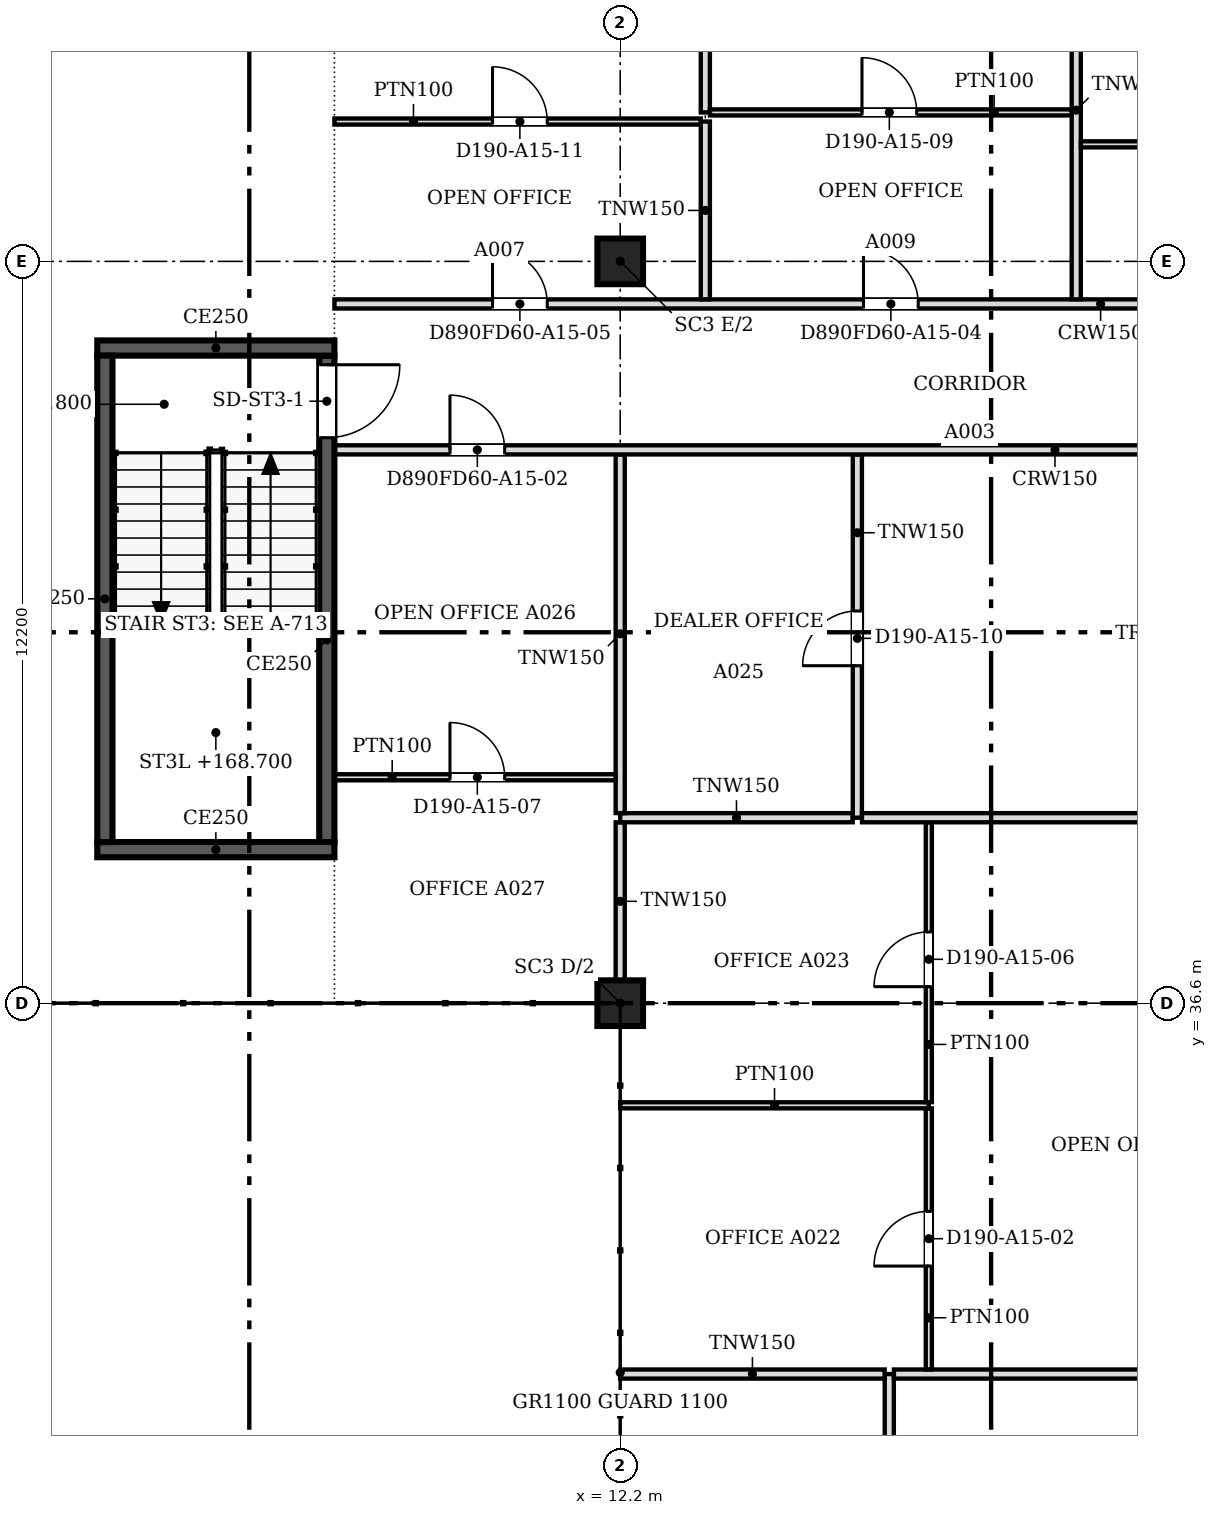
"""IFC4 building model, lengths in metres.
Left out: names, types, materials, properties, quantities, classifications, styles, units other than length and angle.
Written with IfcOpenShell. Run it as: python <this file> out.ifc"""

import sys

from ifc_helpers import new_model, si_unit, direction, frame, frame_2d, origin, origin_2d, place, context, subcontext, project, spatial, polyline, rectangle, outline, extrude, faceted_brep, source, transform, mapped, element, fill, save


model = new_model("IFC4")
c1 = context("Model", 3, precision=1e-05, world=origin(), true_north=direction((0.0, 1.0)))
c2 = subcontext(c1, "Body", "Model", "MODEL_VIEW")
j1 = project(units=[si_unit("LENGTHUNIT", "METRE"), si_unit("PLANEANGLEUNIT", "RADIAN")], contexts=[c1])
p1 = place(None, origin())
s1 = spatial("IfcSite", under=j1, at=p1, CompositionType="ELEMENT")
p2 = place(p1, origin())
s2 = spatial("IfcBuilding", under=s1, at=p2, CompositionType="ELEMENT")
p3 = place(p2, frame((0.0, 0.0, 166.8)))
s3 = spatial("IfcBuildingStorey", under=s2, at=p3, CompositionType="ELEMENT", Elevation=166.8)
for number, where, z_axis, x_axis in (
    (1, (12.2, 36.6, 0.0), (0.0, 0.0, 1.0), (1.0, 0.0, 0.0)),
    (2, (12.2, 48.8, 0.0), (0.0, 0.0, 1.0), (1.0, 0.0, 0.0)),
):
    element("IfcColumn", number, at=place(p3, frame(where, z_axis=z_axis, x_axis=x_axis)), inside=s3, PredefinedType="COLUMN", context=c2, shape_type="SweptSolid", body=[
        extrude(rectangle(XDim=0.75, YDim=0.75, at=origin_2d()), origin(), (0.0, 0.0, 1.0), 3.6),
    ])
m1 = source(origin(), c2, "Body", "Brep", [
    faceted_brep([(0.053, -0.25, 0.0), (2.997, -0.25, 3.8), (0.053, -0.25, 7.6), (0.0, -0.25, 7.532), (0.0, -0.25, 0.068), (0.106, 0.25, 7.532), (2.944, 0.25, 3.868), (2.944, 0.25, 3.732), (0.106, 0.25, 0.068), (2.997, 0.0, 3.8), (0.053, 0.0, 0.0), (0.053, 0.0, 7.6)], [[[0, 1, 2, 3, 4]], [[5, 6, 7, 8]], [[8, 7, 9, 1, 0, 10]], [[6, 5, 11, 2, 1, 9]], [[3, 2, 11]], [[10, 0, 4]], [[8, 10, 4, 3, 11, 5]], [[9, 7, 6]]]),
])
p4 = place(p3, frame((3.431, 53.625, -3.8), z_axis=(0.0, 0.0, 1.0), x_axis=(-0.707106781187, -0.707106781187, 0.0)))
e3 = element("IfcWall", 3, at=p4, inside=s3, PredefinedType="SOLIDWALL", context=c2, shape_type="MappedRepresentation", body=[
    mapped(m1, transform((0.0, 0.0, 0.0), scale=1.0)),
])
m2 = source(origin(), c2, "Body", "SweptSolid", [
    extrude(outline(polyline([(0.253, 0.666), (2.681, 3.8), (0.253, 6.934), (0.253, 0.666)])), frame((0.0, 0.26, 0.0), z_axis=(0.0, -1.0, 0.0), x_axis=(1.0, 0.0, 0.0)), (0.0, 0.0, 1.0), 0.52),
])
p5 = place(p4, origin())
e4 = element("IfcOpeningElement", 4, at=p5, cuts=e3, PredefinedType="OPENING", context=c2, shape_type="MappedRepresentation", body=[
    mapped(m2, transform((0.0, 0.0, 0.0), scale=1.0)),
])
p6 = place(p2, frame((0.0, 0.0, 170.6)))
s4 = spatial("IfcBuildingStorey", under=s2, at=p6, CompositionType="ELEMENT", Elevation=170.6)
m3 = source(origin(), c2, "Body", "Brep", [
    faceted_brep([(2.944, -0.25, 0.0), (2.997, -0.25, 0.068), (2.997, -0.25, 7.532), (2.944, -0.25, 7.6), (0.0, -0.25, 3.8), (0.053, 0.25, 3.868), (2.891, 0.25, 7.532), (2.891, 0.25, 0.068), (0.053, 0.25, 3.732), (2.944, 0.0, 0.0), (2.944, 0.0, 7.6), (0.0, 0.0, 3.8)], [[[0, 1, 2, 3, 4]], [[5, 6, 7, 8]], [[1, 0, 9]], [[10, 3, 2]], [[6, 5, 11, 4, 3, 10]], [[8, 7, 9, 0, 4, 11]], [[8, 11, 5]], [[1, 9, 7, 6, 10, 2]]]),
])
p7 = place(p6, frame((3.394, 53.588, -3.8), z_axis=(0.0, 0.0, 1.0), x_axis=(-0.707106781187, -0.707106781187, 0.0)))
e5 = element("IfcWall", 5, at=p7, inside=s4, PredefinedType="SOLIDWALL", context=c2, shape_type="MappedRepresentation", body=[
    mapped(m3, transform((0.0, 0.0, 0.0), scale=1.0)),
])
m4 = source(origin(), c2, "Body", "SweptSolid", [
    extrude(outline(polyline([(2.744, 6.934), (0.316, 3.8), (2.744, 0.666), (2.744, 6.934)])), frame((0.0, 0.26, 0.0), z_axis=(0.0, -1.0, 0.0), x_axis=(1.0, 0.0, 0.0)), (0.0, 0.0, 1.0), 0.52),
])
p8 = place(p7, origin())
e6 = element("IfcOpeningElement", 6, at=p8, cuts=e5, PredefinedType="OPENING", context=c2, shape_type="MappedRepresentation", body=[
    mapped(m4, transform((0.0, 0.0, 0.0), scale=1.0)),
])
p9 = place(p3, frame((7.5, 39.125, 0.0), z_axis=(0.0, 0.0, 1.0), x_axis=(-1.0, 0.0, 0.0)))
e7 = element("IfcWall", 7, at=p9, inside=s3, PredefinedType="SOLIDWALL", context=c2, shape_type="SweptSolid", body=[
    extrude(rectangle(XDim=3.9, YDim=0.25, at=frame_2d((1.95, 0.0))), origin(), (0.0, 0.0, 1.0), 3.8),
])
p10 = place(p3, frame((3.725, 39.25, 0.0), z_axis=(0.0, 0.0, 1.0), x_axis=(0.0, 1.0, 0.0)))
e8 = element("IfcWall", 8, at=p10, inside=s3, PredefinedType="SOLIDWALL", context=c2, shape_type="SweptSolid", body=[
    extrude(rectangle(XDim=8.0, YDim=0.25, at=frame_2d((4.0, 0.0))), origin(), (0.0, 0.0, 1.0), 3.8),
])
p11 = place(p3, frame((3.6, 47.375, 0.0), z_axis=(0.0, 0.0, 1.0), x_axis=(1.0, 0.0, 0.0)))
e9 = element("IfcWall", 9, at=p11, inside=s3, PredefinedType="SOLIDWALL", context=c2, shape_type="SweptSolid", body=[
    extrude(rectangle(XDim=3.9, YDim=0.25, at=frame_2d((1.95, 0.0))), origin(), (0.0, 0.0, 1.0), 3.8),
])
p12 = place(p3, frame((7.375, 47.25, 0.0), z_axis=(0.0, 0.0, 1.0), x_axis=(0.0, -1.0, 0.0)))
e10 = element("IfcWall", 10, at=p12, inside=s3, PredefinedType="SOLIDWALL", context=c2, shape_type="SweptSolid", body=[
    extrude(rectangle(XDim=8.0, YDim=0.25, at=frame_2d((4.0, 0.0))), origin(), (0.0, 0.0, 1.0), 3.8),
])
m5 = source(origin(), c2, "Body", "SweptSolid", [
    extrude(rectangle(XDim=1.2, YDim=2.1, at=frame_2d((0.6, 1.05))), frame((0.0, 0.135, 0.0), z_axis=(0.0, -1.0, 0.0), x_axis=(1.0, 0.0, 0.0)), (0.0, 0.0, 1.0), 0.27),
])
p13 = place(p12, frame((0.15, 0.0, 0.0)))
e11 = element("IfcOpeningElement", 11, at=p13, cuts=e10, PredefinedType="OPENING", context=c2, shape_type="MappedRepresentation", body=[
    mapped(m5, transform((0.0, 0.0, 0.0), scale=1.0)),
])
p14 = place(p3, frame((16.625, 24.476, 0.0), z_axis=(0.0, 0.0, 1.0), x_axis=(0.0, 1.0, 0.0)))
e12 = element("IfcWall", 12, at=p14, inside=s3, PredefinedType="PARTITIONING", context=c2, shape_type="SweptSolid", body=[
    extrude(rectangle(XDim=6.024, YDim=0.15, at=frame_2d((3.012, 0.0))), origin(), (0.0, 0.0, 1.0), 3.067),
])
m6 = source(origin(), c2, "Body", "SweptSolid", [
    extrude(rectangle(XDim=0.9, YDim=2.1, at=frame_2d((0.45, 1.05))), frame((0.0, 0.085, 0.0), z_axis=(0.0, -1.0, 0.0), x_axis=(1.0, 0.0, 0.0)), (0.0, 0.0, 1.0), 0.17),
])
p15 = place(p14, frame((2.6, 0.0, 0.0)))
e13 = element("IfcOpeningElement", 13, at=p15, cuts=e12, PredefinedType="OPENING", context=c2, shape_type="MappedRepresentation", body=[
    mapped(m6, transform((0.0, 0.0, 0.0), scale=1.0)),
])
p16 = place(p3, frame((12.2, 30.5, 0.0), z_axis=(0.0, 0.0, 1.0), x_axis=(1.0, 0.0, 0.0)))
e14 = element("IfcWall", 14, at=p16, inside=s3, PredefinedType="PARTITIONING", context=c2, shape_type="SweptSolid", body=[
    extrude(rectangle(XDim=4.349, YDim=0.15, at=frame_2d((2.175, 0.0))), origin(), (0.0, 0.0, 1.0), 3.067),
])
p17 = place(p3, frame((16.701, 30.5, 0.0), z_axis=(0.0, 0.0, 1.0), x_axis=(1.0, 0.0, 0.0)))
e15 = element("IfcWall", 15, at=p17, inside=s3, PredefinedType="PARTITIONING", context=c2, shape_type="SweptSolid", body=[
    extrude(rectangle(XDim=11.623, YDim=0.15, at=frame_2d((5.812, 0.0))), origin(), (0.0, 0.0, 1.0), 3.067),
])
p18 = place(p3, frame((17.275, 30.576, 0.0), z_axis=(0.0, 0.0, 1.0), x_axis=(0.0, 1.0, 0.0)))
e16 = element("IfcWall", 16, at=p18, inside=s3, PredefinedType="PARTITIONING", context=c2, shape_type="SweptSolid", body=[
    extrude(rectangle(XDim=4.293, YDim=0.1, at=frame_2d((2.147, 0.0))), origin(), (0.0, 0.0, 1.0), 3.067),
])
m7 = source(origin(), c2, "Body", "SweptSolid", [
    extrude(rectangle(XDim=0.9, YDim=2.1, at=frame_2d((0.45, 1.05))), frame((0.0, 0.06, 0.0), z_axis=(0.0, -1.0, 0.0), x_axis=(1.0, 0.0, 0.0)), (0.0, 0.0, 1.0), 0.12),
])
p19 = place(p18, frame((1.7, 0.0, 0.0)))
e17 = element("IfcOpeningElement", 17, at=p19, cuts=e16, PredefinedType="OPENING", context=c2, shape_type="MappedRepresentation", body=[
    mapped(m7, transform((0.0, 0.0, 0.0), scale=1.0)),
])
p20 = place(p3, frame((12.2, 34.92, 0.0), z_axis=(0.0, 0.0, 1.0), x_axis=(1.0, 0.0, 0.0)))
e18 = element("IfcWall", 18, at=p20, inside=s3, PredefinedType="PARTITIONING", context=c2, shape_type="SweptSolid", body=[
    extrude(rectangle(XDim=5.075, YDim=0.1, at=frame_2d((2.538, 0.0))), origin(), (0.0, 0.0, 1.0), 3.067),
])
p21 = place(p3, frame((17.275, 34.971, 0.0), z_axis=(0.0, 0.0, 1.0), x_axis=(0.0, 1.0, 0.0)))
e19 = element("IfcWall", 19, at=p21, inside=s3, PredefinedType="PARTITIONING", context=c2, shape_type="SweptSolid", body=[
    extrude(rectangle(XDim=4.603, YDim=0.1, at=frame_2d((2.301, 0.0))), origin(), (0.0, 0.0, 1.0), 3.067),
])
p22 = place(p21, frame((1.9, 0.0, 0.0)))
e20 = element("IfcOpeningElement", 20, at=p22, cuts=e19, PredefinedType="OPENING", context=c2, shape_type="MappedRepresentation", body=[
    mapped(m7, transform((0.0, 0.0, 0.0), scale=1.0)),
])
p23 = place(p3, frame((12.2, 36.976, 0.0), z_axis=(0.0, 0.0, 1.0), x_axis=(0.0, 1.0, 0.0)))
e21 = element("IfcWall", 21, at=p23, inside=s3, PredefinedType="PARTITIONING", context=c2, shape_type="SweptSolid", body=[
    extrude(rectangle(XDim=2.598, YDim=0.15, at=frame_2d((1.299, 0.0))), origin(), (0.0, 0.0, 1.0), 3.067),
])
p24 = place(p3, frame((12.2, 39.65, 0.0), z_axis=(0.0, 0.0, 1.0), x_axis=(1.0, 0.0, 0.0)))
e22 = element("IfcWall", 22, at=p24, inside=s3, PredefinedType="PARTITIONING", context=c2, shape_type="SweptSolid", body=[
    extrude(rectangle(XDim=3.824, YDim=0.15, at=frame_2d((1.912, 0.0))), origin(), (0.0, 0.0, 1.0), 3.067),
])
p25 = place(p3, frame((16.1, 39.65, 0.0), z_axis=(0.0, 0.0, 1.0), x_axis=(0.0, 1.0, 0.0)))
e23 = element("IfcWall", 23, at=p25, inside=s3, PredefinedType="PARTITIONING", context=c2, shape_type="SweptSolid", body=[
    extrude(rectangle(XDim=5.974, YDim=0.15, at=frame_2d((2.987, 0.0))), origin(), (0.0, 0.0, 1.0), 3.067),
])
p26 = place(p25, frame((2.5, 0.0, 0.0)))
e24 = element("IfcOpeningElement", 24, at=p26, cuts=e23, PredefinedType="OPENING", context=c2, shape_type="MappedRepresentation", body=[
    mapped(m6, transform((0.0, 0.0, 0.0), scale=1.0)),
])
p27 = place(p3, frame((16.176, 39.65, 0.0), z_axis=(0.0, 0.0, 1.0), x_axis=(1.0, 0.0, 0.0)))
e25 = element("IfcWall", 25, at=p27, inside=s3, PredefinedType="PARTITIONING", context=c2, shape_type="SweptSolid", body=[
    extrude(rectangle(XDim=12.148, YDim=0.15, at=frame_2d((6.074, 0.0))), origin(), (0.0, 0.0, 1.0), 3.067),
])
p28 = place(p3, frame((12.2, 39.726, 0.0), z_axis=(0.0, 0.0, 1.0), x_axis=(0.0, 1.0, 0.0)))
e26 = element("IfcWall", 26, at=p28, inside=s3, PredefinedType="PARTITIONING", context=c2, shape_type="SweptSolid", body=[
    extrude(rectangle(XDim=5.898, YDim=0.15, at=frame_2d((2.949, 0.0))), origin(), (0.0, 0.0, 1.0), 3.067),
])
p29 = place(p3, frame((12.124, 40.315, 0.0), z_axis=(0.0, 0.0, 1.0), x_axis=(-1.0, 0.0, 0.0)))
e27 = element("IfcWall", 27, at=p29, inside=s3, PredefinedType="PARTITIONING", context=c2, shape_type="SweptSolid", body=[
    extrude(rectangle(XDim=4.624, YDim=0.1, at=frame_2d((2.312, 0.0))), origin(), (0.0, 0.0, 1.0), 3.067),
])
p30 = place(p29, frame((1.824, 0.0, 0.0)))
e28 = element("IfcOpeningElement", 28, at=p30, cuts=e27, PredefinedType="OPENING", context=c2, shape_type="MappedRepresentation", body=[
    mapped(m7, transform((0.0, 0.0, 0.0), scale=1.0)),
])
p31 = place(p3, frame((28.4, 45.7, 0.0), z_axis=(0.0, 0.0, 1.0), x_axis=(-1.0, 0.0, 0.0)))
e29 = element("IfcWall", 29, at=p31, inside=s3, PredefinedType="PARTITIONING", context=c2, shape_type="SweptSolid", body=[
    extrude(rectangle(XDim=20.9, YDim=0.15, at=frame_2d((10.45, 0.0))), origin(), (0.0, 0.0, 1.0), 3.067),
])
p32 = place(p31, frame((18.1, 0.0, 0.0)))
e30 = element("IfcOpeningElement", 30, at=p32, cuts=e29, PredefinedType="OPENING", context=c2, shape_type="MappedRepresentation", body=[
    mapped(m6, transform((0.0, 0.0, 0.0), scale=1.0)),
])
p33 = place(p3, frame((7.5, 48.1, 0.0), z_axis=(0.0, 0.0, 1.0), x_axis=(1.0, 0.0, 0.0)))
e31 = element("IfcWall", 31, at=p33, inside=s3, PredefinedType="PARTITIONING", context=c2, shape_type="SweptSolid", body=[
    extrude(rectangle(XDim=20.9, YDim=0.15, at=frame_2d((10.45, 0.0))), origin(), (0.0, 0.0, 1.0), 3.067),
])
p34 = place(p33, frame((8.701, 0.0, 0.0)))
e32 = element("IfcOpeningElement", 32, at=p34, cuts=e31, PredefinedType="OPENING", context=c2, shape_type="MappedRepresentation", body=[
    mapped(m6, transform((0.0, 0.0, 0.0), scale=1.0)),
])
p35 = place(p33, frame((2.6, 0.0, 0.0)))
e33 = element("IfcOpeningElement", 33, at=p35, cuts=e31, PredefinedType="OPENING", context=c2, shape_type="MappedRepresentation", body=[
    mapped(m6, transform((0.0, 0.0, 0.0), scale=1.0)),
])
p36 = place(p33, frame((15.6, 0.0, 0.0)))
e34 = element("IfcOpeningElement", 34, at=p36, cuts=e31, PredefinedType="OPENING", context=c2, shape_type="MappedRepresentation", body=[
    mapped(m6, transform((0.0, 0.0, 0.0), scale=1.0)),
])
p37 = place(p3, frame((13.6, 48.176, 0.0), z_axis=(0.0, 0.0, 1.0), x_axis=(0.0, 1.0, 0.0)))
e35 = element("IfcWall", 35, at=p37, inside=s3, PredefinedType="PARTITIONING", context=c2, shape_type="SweptSolid", body=[
    extrude(rectangle(XDim=2.924, YDim=0.15, at=frame_2d((1.462, 0.0))), origin(), (0.0, 0.0, 1.0), 3.067),
])
p38 = place(p3, frame((19.7, 48.176, 0.0), z_axis=(0.0, 0.0, 1.0), x_axis=(0.0, 1.0, 0.0)))
e36 = element("IfcWall", 36, at=p38, inside=s3, PredefinedType="PARTITIONING", context=c2, shape_type="SweptSolid", body=[
    extrude(rectangle(XDim=6.224, YDim=0.15, at=frame_2d((3.112, 0.0))), origin(), (0.0, 0.0, 1.0), 3.067),
])
p39 = place(p3, frame((19.776, 50.725, 0.0), z_axis=(0.0, 0.0, 1.0), x_axis=(1.0, 0.0, 0.0)))
e37 = element("IfcWall", 37, at=p39, inside=s3, PredefinedType="PARTITIONING", context=c2, shape_type="SweptSolid", body=[
    extrude(rectangle(XDim=8.548, YDim=0.1, at=frame_2d((4.274, 0.0))), origin(), (0.0, 0.0, 1.0), 3.067),
])
p40 = place(p39, frame((1.6, 0.0, 0.0)))
e38 = element("IfcOpeningElement", 38, at=p40, cuts=e37, PredefinedType="OPENING", context=c2, shape_type="MappedRepresentation", body=[
    mapped(m7, transform((0.0, 0.0, 0.0), scale=1.0)),
])
p41 = place(p39, frame((5.927, 0.0, 0.0)))
e39 = element("IfcOpeningElement", 39, at=p41, cuts=e37, PredefinedType="OPENING", context=c2, shape_type="MappedRepresentation", body=[
    mapped(m7, transform((0.0, 0.0, 0.0), scale=1.0)),
])
p42 = place(p3, frame((7.5, 51.1, 0.0), z_axis=(0.0, 0.0, 1.0), x_axis=(1.0, 0.0, 0.0)))
e40 = element("IfcWall", 40, at=p42, inside=s3, PredefinedType="PARTITIONING", context=c2, shape_type="SweptSolid", body=[
    extrude(rectangle(XDim=6.024, YDim=0.1, at=frame_2d((3.012, 0.0))), origin(), (0.0, 0.0, 1.0), 3.067),
])
p43 = place(p42, frame((2.6, 0.0, 0.0)))
e41 = element("IfcOpeningElement", 41, at=p43, cuts=e40, PredefinedType="OPENING", context=c2, shape_type="MappedRepresentation", body=[
    mapped(m7, transform((0.0, 0.0, 0.0), scale=1.0)),
])
p44 = place(p3, frame((13.6, 51.25, 0.0), z_axis=(0.0, 0.0, 1.0), x_axis=(0.0, 1.0, 0.0)))
e42 = element("IfcWall", 42, at=p44, inside=s3, PredefinedType="PARTITIONING", context=c2, shape_type="SweptSolid", body=[
    extrude(rectangle(XDim=3.15, YDim=0.15, at=frame_2d((1.575, 0.0))), origin(), (0.0, 0.0, 1.0), 3.067),
])
p45 = place(p3, frame((13.676, 51.25, 0.0), z_axis=(0.0, 0.0, 1.0), x_axis=(1.0, 0.0, 0.0)))
e43 = element("IfcWall", 43, at=p45, inside=s3, PredefinedType="PARTITIONING", context=c2, shape_type="SweptSolid", body=[
    extrude(rectangle(XDim=5.948, YDim=0.1, at=frame_2d((2.974, 0.0))), origin(), (0.0, 0.0, 1.0), 3.067),
])
p46 = place(p45, frame((2.5, 0.0, 0.0)))
e44 = element("IfcOpeningElement", 44, at=p46, cuts=e43, PredefinedType="OPENING", context=c2, shape_type="MappedRepresentation", body=[
    mapped(m7, transform((0.0, 0.0, 0.0), scale=1.0)),
])
m8 = source(origin(), c2, "Body", "SweptSolid", [
    extrude(rectangle(XDim=1.2, YDim=2.1, at=frame_2d((0.6, 1.05))), frame((0.0, 0.025, 0.0), z_axis=(0.0, -1.0, 0.0), x_axis=(1.0, 0.0, 0.0)), (0.0, 0.0, 1.0), 0.05),
])
p47 = place(p13, origin())
e45 = element("IfcDoor", 45, at=p47, inside=s3, OperationType="SINGLE_SWING_LEFT", PredefinedType="DOOR", context=c2, shape_type="MappedRepresentation", body=[
    mapped(m8, transform((0.0, 0.0, 0.0), scale=1.0)),
])
fill(e11, e45)
m9 = source(origin(), c2, "Body", "SweptSolid", [
    extrude(rectangle(XDim=0.9, YDim=2.1, at=frame_2d((0.45, 1.05))), frame((0.0, 0.025, 0.0), z_axis=(0.0, -1.0, 0.0), x_axis=(1.0, 0.0, 0.0)), (0.0, 0.0, 1.0), 0.05),
])
p48 = place(p19, origin())
e46 = element("IfcDoor", 46, at=p48, inside=s3, OperationType="SINGLE_SWING_LEFT", PredefinedType="DOOR", context=c2, shape_type="MappedRepresentation", body=[
    mapped(m9, transform((0.0, 0.0, 0.0), scale=1.0)),
])
fill(e17, e46)
p49 = place(p22, origin())
e47 = element("IfcDoor", 47, at=p49, inside=s3, OperationType="SINGLE_SWING_LEFT", PredefinedType="DOOR", context=c2, shape_type="MappedRepresentation", body=[
    mapped(m9, transform((0.0, 0.0, 0.0), scale=1.0)),
])
fill(e20, e47)
p50 = place(p30, origin())
e48 = element("IfcDoor", 48, at=p50, inside=s3, OperationType="SINGLE_SWING_RIGHT", PredefinedType="DOOR", context=c2, shape_type="MappedRepresentation", body=[
    mapped(m9, transform((0.0, 0.0, 0.0), scale=1.0)),
])
fill(e28, e48)
p51 = place(p32, origin())
e49 = element("IfcDoor", 49, at=p51, inside=s3, OperationType="SINGLE_SWING_RIGHT", PredefinedType="DOOR", context=c2, shape_type="MappedRepresentation", body=[
    mapped(m9, transform((0.0, 0.0, 0.0), scale=1.0)),
])
fill(e30, e49)
p52 = place(p46, origin())
e50 = element("IfcDoor", 50, at=p52, inside=s3, OperationType="SINGLE_SWING_LEFT", PredefinedType="DOOR", context=c2, shape_type="MappedRepresentation", body=[
    mapped(m9, transform((0.0, 0.0, 0.0), scale=1.0)),
])
fill(e44, e50)
p53 = place(p26, origin())
e51 = element("IfcDoor", 51, at=p53, inside=s3, OperationType="SINGLE_SWING_LEFT", PredefinedType="DOOR", context=c2, shape_type="MappedRepresentation", body=[
    mapped(m9, transform((0.0, 0.0, 0.0), scale=1.0)),
])
fill(e24, e51)
p54 = place(p43, origin())
e52 = element("IfcDoor", 52, at=p54, inside=s3, OperationType="SINGLE_SWING_LEFT", PredefinedType="DOOR", context=c2, shape_type="MappedRepresentation", body=[
    mapped(m9, transform((0.0, 0.0, 0.0), scale=1.0)),
])
fill(e41, e52)
p55 = place(p34, origin())
e53 = element("IfcDoor", 53, at=p55, inside=s3, OperationType="SINGLE_SWING_LEFT", PredefinedType="DOOR", context=c2, shape_type="MappedRepresentation", body=[
    mapped(m9, transform((0.0, 0.0, 0.0), scale=1.0)),
])
fill(e32, e53)
p56 = place(p35, origin())
e54 = element("IfcDoor", 54, at=p56, inside=s3, OperationType="SINGLE_SWING_LEFT", PredefinedType="DOOR", context=c2, shape_type="MappedRepresentation", body=[
    mapped(m9, transform((0.0, 0.0, 0.0), scale=1.0)),
])
fill(e33, e54)
save(model, sys.argv[1])
